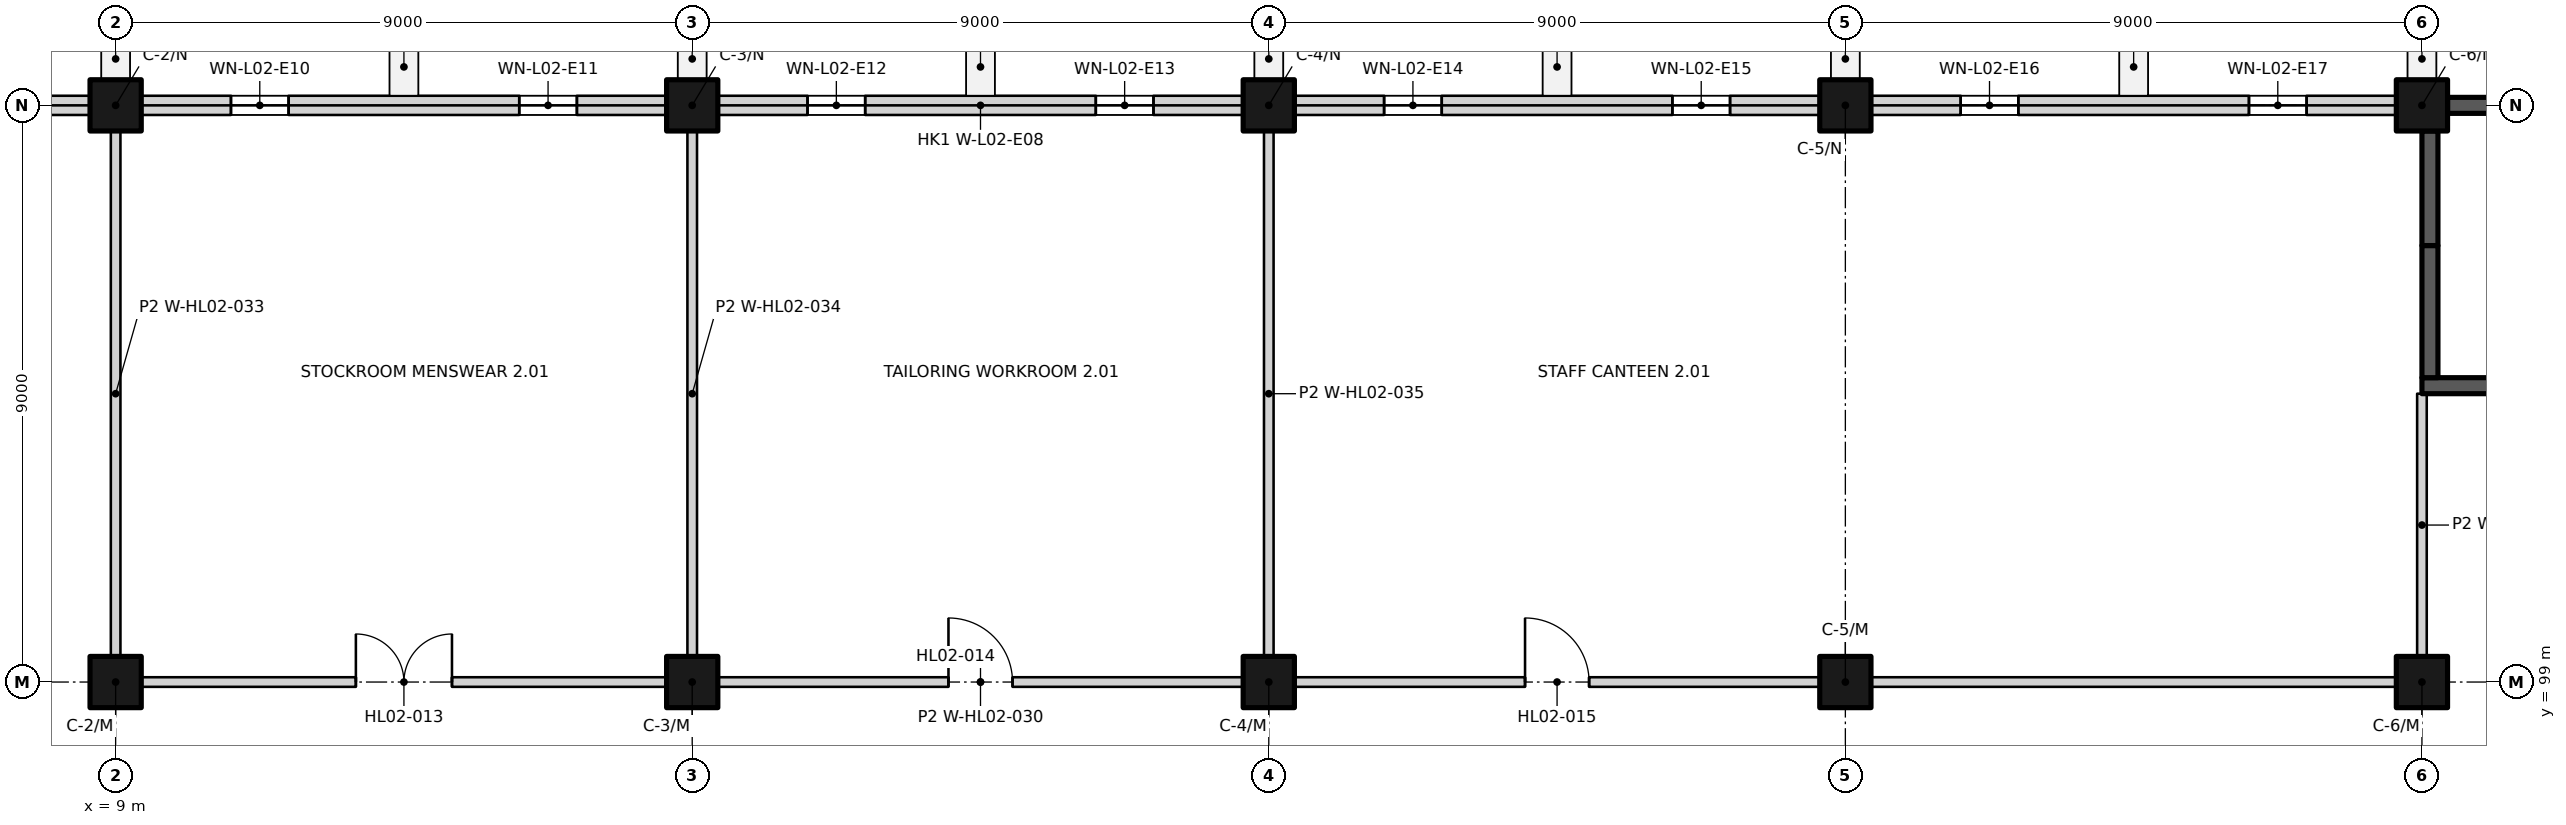
"""IFC4 building model, lengths in metres.
Left out: names, types, materials, properties, quantities, classifications, styles, units other than length and angle.
Written with IfcOpenShell. Run it as: python <this file> out.ifc"""

import sys

from ifc_helpers import new_model, si_unit, direction, frame, frame_2d, origin, origin_2d, place, context, subcontext, project, spatial, rectangle, extrude, element, fill, save


model = new_model("IFC4")
c1 = context("Model", 3, precision=1e-05, world=origin(), true_north=direction((0.0, 1.0)))
c2 = subcontext(c1, "Body", "Model", "MODEL_VIEW")
j1 = project(units=[si_unit("LENGTHUNIT", "METRE"), si_unit("PLANEANGLEUNIT", "RADIAN")], contexts=[c1])
p1 = place(None, origin())
s1 = spatial("IfcSite", under=j1, at=p1, CompositionType="ELEMENT")
p2 = place(p1, origin())
s2 = spatial("IfcBuilding", under=s1, at=p2, CompositionType="ELEMENT")
p3 = place(p2, frame((0.0, 0.0, 10.5)))
s3 = spatial("IfcBuildingStorey", under=s2, at=p3, CompositionType="ELEMENT", Elevation=10.5)
for number, where, z_axis, x_axis in (
    (1, (9.0, 99.0, 0.0), (0.0, 0.0, 1.0), (1.0, 0.0, 0.0)),
    (2, (18.0, 99.0, 0.0), (0.0, 0.0, 1.0), (1.0, 0.0, 0.0)),
    (3, (27.0, 99.0, 0.0), (0.0, 0.0, 1.0), (1.0, 0.0, 0.0)),
    (4, (36.0, 99.0, 0.0), (0.0, 0.0, 1.0), (1.0, 0.0, 0.0)),
    (5, (45.0, 99.0, 0.0), (0.0, 0.0, 1.0), (1.0, 0.0, 0.0)),
    (6, (9.0, 108.0, 0.0), (0.0, 0.0, 1.0), (1.0, 0.0, 0.0)),
    (7, (18.0, 108.0, 0.0), (0.0, 0.0, 1.0), (1.0, 0.0, 0.0)),
    (8, (27.0, 108.0, 0.0), (0.0, 0.0, 1.0), (1.0, 0.0, 0.0)),
    (9, (36.0, 108.0, 0.0), (0.0, 0.0, 1.0), (1.0, 0.0, 0.0)),
    (10, (45.0, 108.0, 0.0), (0.0, 0.0, 1.0), (1.0, 0.0, 0.0)),
):
    element("IfcColumn", number, at=place(p3, frame(where, z_axis=z_axis, x_axis=x_axis)), inside=s3, PredefinedType="COLUMN", context=c2, shape_type="SweptSolid", body=[
        extrude(rectangle(XDim=0.8, YDim=0.8, at=origin_2d()), origin(), (0.0, 0.0, 1.0), 4.5),
    ])
p4 = place(p3, frame((45.0, 103.625, 0.0), z_axis=(0.0, 0.0, 1.0), x_axis=(1.0, 0.0, 0.0)))
e11 = element("IfcWall", 11, at=p4, inside=s3, PredefinedType="SHEAR", context=c2, shape_type="SweptSolid", body=[
    extrude(rectangle(XDim=9.0, YDim=0.25, at=frame_2d((4.5, 0.0))), origin(), (0.0, 0.0, 1.0), 4.5),
])
p5 = place(p3, frame((45.4, 108.0, 0.0), z_axis=(0.0, 0.0, 1.0), x_axis=(1.0, 0.0, 0.0)))
e12 = element("IfcWall", 12, at=p5, inside=s3, PredefinedType="SHEAR", context=c2, shape_type="SweptSolid", body=[
    extrude(rectangle(XDim=8.2, YDim=0.25, at=frame_2d((4.1, 0.0))), origin(), (0.0, 0.0, 1.0), 4.5),
])
p6 = place(p3, frame((45.125, 103.75, 0.0), z_axis=(0.0, 0.0, 1.0), x_axis=(0.0, 1.0, 0.0)))
e13 = element("IfcWall", 13, at=p6, inside=s3, PredefinedType="SHEAR", context=c2, shape_type="SweptSolid", body=[
    extrude(rectangle(XDim=2.062, YDim=0.25, at=frame_2d((1.031, 0.0))), origin(), (0.0, 0.0, 1.0), 4.5),
])
p7 = place(p3, frame((45.125, 105.812, 0.0), z_axis=(0.0, 0.0, 1.0), x_axis=(0.0, 1.0, 0.0)))
e14 = element("IfcWall", 14, at=p7, inside=s3, PredefinedType="SHEAR", context=c2, shape_type="SweptSolid", body=[
    extrude(rectangle(XDim=1.788, YDim=0.25, at=frame_2d((0.894, 0.0))), origin(), (0.0, 0.0, 1.0), 4.5),
])
p8 = place(p3, frame((4.5, 108.0, 0.0), z_axis=(0.0, 0.0, 1.0), x_axis=(1.0, 0.0, 0.0)))
e15 = element("IfcWall", 15, at=p8, inside=s3, PredefinedType="SOLIDWALL", context=c2, shape_type="SweptSolid", body=[
    extrude(rectangle(XDim=4.1, YDim=0.3, at=frame_2d((2.05, 0.0))), origin(), (0.0, 0.0, 1.0), 3.7),
])
p9 = place(p8, frame((1.8, 0.0, 0.45)))
e16 = element("IfcOpeningElement", 16, at=p9, cuts=e15, PredefinedType="OPENING", context=c2, shape_type="SweptSolid", body=[
    extrude(rectangle(XDim=0.9, YDim=3.0, at=frame_2d((0.45, 1.5))), frame((0.0, 0.16, 0.0), z_axis=(0.0, -1.0, 0.0), x_axis=(1.0, 0.0, 0.0)), (0.0, 0.0, 1.0), 0.32),
])
p10 = place(p3, frame((9.4, 108.0, 0.0), z_axis=(0.0, 0.0, 1.0), x_axis=(1.0, 0.0, 0.0)))
e17 = element("IfcWall", 17, at=p10, inside=s3, PredefinedType="SOLIDWALL", context=c2, shape_type="SweptSolid", body=[
    extrude(rectangle(XDim=8.2, YDim=0.3, at=frame_2d((4.1, 0.0))), origin(), (0.0, 0.0, 1.0), 3.7),
])
p11 = place(p10, frame((1.4, 0.0, 0.45)))
e18 = element("IfcOpeningElement", 18, at=p11, cuts=e17, PredefinedType="OPENING", context=c2, shape_type="SweptSolid", body=[
    extrude(rectangle(XDim=0.9, YDim=3.0, at=frame_2d((0.45, 1.5))), frame((0.0, 0.16, 0.0), z_axis=(0.0, -1.0, 0.0), x_axis=(1.0, 0.0, 0.0)), (0.0, 0.0, 1.0), 0.32),
])
p12 = place(p10, frame((5.9, 0.0, 0.45)))
e19 = element("IfcOpeningElement", 19, at=p12, cuts=e17, PredefinedType="OPENING", context=c2, shape_type="SweptSolid", body=[
    extrude(rectangle(XDim=0.9, YDim=3.0, at=frame_2d((0.45, 1.5))), frame((0.0, 0.16, 0.0), z_axis=(0.0, -1.0, 0.0), x_axis=(1.0, 0.0, 0.0)), (0.0, 0.0, 1.0), 0.32),
])
p13 = place(p3, frame((18.4, 108.0, 0.0), z_axis=(0.0, 0.0, 1.0), x_axis=(1.0, 0.0, 0.0)))
e20 = element("IfcWall", 20, at=p13, inside=s3, PredefinedType="SOLIDWALL", context=c2, shape_type="SweptSolid", body=[
    extrude(rectangle(XDim=8.2, YDim=0.3, at=frame_2d((4.1, 0.0))), origin(), (0.0, 0.0, 1.0), 3.7),
])
p14 = place(p13, frame((1.4, 0.0, 0.45)))
e21 = element("IfcOpeningElement", 21, at=p14, cuts=e20, PredefinedType="OPENING", context=c2, shape_type="SweptSolid", body=[
    extrude(rectangle(XDim=0.9, YDim=3.0, at=frame_2d((0.45, 1.5))), frame((0.0, 0.16, 0.0), z_axis=(0.0, -1.0, 0.0), x_axis=(1.0, 0.0, 0.0)), (0.0, 0.0, 1.0), 0.32),
])
p15 = place(p13, frame((5.9, 0.0, 0.45)))
e22 = element("IfcOpeningElement", 22, at=p15, cuts=e20, PredefinedType="OPENING", context=c2, shape_type="SweptSolid", body=[
    extrude(rectangle(XDim=0.9, YDim=3.0, at=frame_2d((0.45, 1.5))), frame((0.0, 0.16, 0.0), z_axis=(0.0, -1.0, 0.0), x_axis=(1.0, 0.0, 0.0)), (0.0, 0.0, 1.0), 0.32),
])
p16 = place(p3, frame((27.4, 108.0, 0.0), z_axis=(0.0, 0.0, 1.0), x_axis=(1.0, 0.0, 0.0)))
e23 = element("IfcWall", 23, at=p16, inside=s3, PredefinedType="SOLIDWALL", context=c2, shape_type="SweptSolid", body=[
    extrude(rectangle(XDim=8.2, YDim=0.3, at=frame_2d((4.1, 0.0))), origin(), (0.0, 0.0, 1.0), 3.7),
])
p17 = place(p16, frame((1.4, 0.0, 0.45)))
e24 = element("IfcOpeningElement", 24, at=p17, cuts=e23, PredefinedType="OPENING", context=c2, shape_type="SweptSolid", body=[
    extrude(rectangle(XDim=0.9, YDim=3.0, at=frame_2d((0.45, 1.5))), frame((0.0, 0.16, 0.0), z_axis=(0.0, -1.0, 0.0), x_axis=(1.0, 0.0, 0.0)), (0.0, 0.0, 1.0), 0.32),
])
p18 = place(p16, frame((5.9, 0.0, 0.45)))
e25 = element("IfcOpeningElement", 25, at=p18, cuts=e23, PredefinedType="OPENING", context=c2, shape_type="SweptSolid", body=[
    extrude(rectangle(XDim=0.9, YDim=3.0, at=frame_2d((0.45, 1.5))), frame((0.0, 0.16, 0.0), z_axis=(0.0, -1.0, 0.0), x_axis=(1.0, 0.0, 0.0)), (0.0, 0.0, 1.0), 0.32),
])
p19 = place(p3, frame((36.4, 108.0, 0.0), z_axis=(0.0, 0.0, 1.0), x_axis=(1.0, 0.0, 0.0)))
e26 = element("IfcWall", 26, at=p19, inside=s3, PredefinedType="SOLIDWALL", context=c2, shape_type="SweptSolid", body=[
    extrude(rectangle(XDim=8.2, YDim=0.3, at=frame_2d((4.1, 0.0))), origin(), (0.0, 0.0, 1.0), 3.7),
])
p20 = place(p19, frame((1.4, 0.0, 0.45)))
e27 = element("IfcOpeningElement", 27, at=p20, cuts=e26, PredefinedType="OPENING", context=c2, shape_type="SweptSolid", body=[
    extrude(rectangle(XDim=0.9, YDim=3.0, at=frame_2d((0.45, 1.5))), frame((0.0, 0.16, 0.0), z_axis=(0.0, -1.0, 0.0), x_axis=(1.0, 0.0, 0.0)), (0.0, 0.0, 1.0), 0.32),
])
p21 = place(p19, frame((5.9, 0.0, 0.45)))
e28 = element("IfcOpeningElement", 28, at=p21, cuts=e26, PredefinedType="OPENING", context=c2, shape_type="SweptSolid", body=[
    extrude(rectangle(XDim=0.9, YDim=3.0, at=frame_2d((0.45, 1.5))), frame((0.0, 0.16, 0.0), z_axis=(0.0, -1.0, 0.0), x_axis=(1.0, 0.0, 0.0)), (0.0, 0.0, 1.0), 0.32),
])
p22 = place(p3, frame((9.4, 99.0, 0.0), z_axis=(0.0, 0.0, 1.0), x_axis=(1.0, 0.0, 0.0)))
e29 = element("IfcWall", 29, at=p22, inside=s3, PredefinedType="PARTITIONING", context=c2, shape_type="SweptSolid", body=[
    extrude(rectangle(XDim=8.2, YDim=0.15, at=frame_2d((4.1, 0.0))), origin(), (0.0, 0.0, 1.0), 4.2),
])
p23 = place(p22, frame((3.35, 0.0, 0.0)))
e30 = element("IfcOpeningElement", 30, at=p23, cuts=e29, PredefinedType="OPENING", context=c2, shape_type="SweptSolid", body=[
    extrude(rectangle(XDim=1.5, YDim=2.1, at=frame_2d((0.75, 1.05))), frame((0.0, 0.085, 0.0), z_axis=(0.0, -1.0, 0.0), x_axis=(1.0, 0.0, 0.0)), (0.0, 0.0, 1.0), 0.17),
])
p24 = place(p3, frame((18.4, 99.0, 0.0), z_axis=(0.0, 0.0, 1.0), x_axis=(1.0, 0.0, 0.0)))
e31 = element("IfcWall", 31, at=p24, inside=s3, PredefinedType="PARTITIONING", context=c2, shape_type="SweptSolid", body=[
    extrude(rectangle(XDim=8.2, YDim=0.15, at=frame_2d((4.1, 0.0))), origin(), (0.0, 0.0, 1.0), 4.2),
])
p25 = place(p24, frame((3.6, 0.0, 0.0)))
e32 = element("IfcOpeningElement", 32, at=p25, cuts=e31, PredefinedType="OPENING", context=c2, shape_type="SweptSolid", body=[
    extrude(rectangle(XDim=1.0, YDim=2.4, at=frame_2d((0.5, 1.2))), frame((0.0, 0.085, 0.0), z_axis=(0.0, -1.0, 0.0), x_axis=(1.0, 0.0, 0.0)), (0.0, 0.0, 1.0), 0.17),
])
p26 = place(p3, frame((27.4, 99.0, 0.0), z_axis=(0.0, 0.0, 1.0), x_axis=(1.0, 0.0, 0.0)))
e33 = element("IfcWall", 33, at=p26, inside=s3, PredefinedType="PARTITIONING", context=c2, shape_type="SweptSolid", body=[
    extrude(rectangle(XDim=8.2, YDim=0.15, at=frame_2d((4.1, 0.0))), origin(), (0.0, 0.0, 1.0), 4.2),
])
p27 = place(p26, frame((3.6, 0.0, 0.0)))
e34 = element("IfcOpeningElement", 34, at=p27, cuts=e33, PredefinedType="OPENING", context=c2, shape_type="SweptSolid", body=[
    extrude(rectangle(XDim=1.0, YDim=2.4, at=frame_2d((0.5, 1.2))), frame((0.0, 0.085, 0.0), z_axis=(0.0, -1.0, 0.0), x_axis=(1.0, 0.0, 0.0)), (0.0, 0.0, 1.0), 0.17),
])
for number, where, z_axis, x_axis in (
    (35, (36.4, 99.0, 0.0), (0.0, 0.0, 1.0), (1.0, 0.0, 0.0)),
    (36, (9.0, 99.4, 0.0), (0.0, 0.0, 1.0), (0.0, 1.0, 0.0)),
    (37, (18.0, 99.4, 0.0), (0.0, 0.0, 1.0), (0.0, 1.0, 0.0)),
    (38, (27.0, 99.4, 0.0), (0.0, 0.0, 1.0), (0.0, 1.0, 0.0)),
):
    element("IfcWall", number, at=place(p3, frame(where, z_axis=z_axis, x_axis=x_axis)), inside=s3, PredefinedType="PARTITIONING", context=c2, shape_type="SweptSolid", body=[
        extrude(rectangle(XDim=8.2, YDim=0.15, at=frame_2d((4.1, 0.0))), origin(), (0.0, 0.0, 1.0), 4.2),
    ])
p28 = place(p3, frame((45.0, 99.4, 0.0), z_axis=(0.0, 0.0, 1.0), x_axis=(0.0, 1.0, 0.0)))
e39 = element("IfcWall", 39, at=p28, inside=s3, PredefinedType="PARTITIONING", context=c2, shape_type="SweptSolid", body=[
    extrude(rectangle(XDim=4.1, YDim=0.15, at=frame_2d((2.05, 0.0))), origin(), (0.0, 0.0, 1.0), 4.2),
])
p29 = place(p11, origin())
e40 = element("IfcWindow", 40, at=p29, inside=s3, PartitioningType="SINGLE_PANEL", PredefinedType="WINDOW", context=c2, shape_type="SweptSolid", body=[
    extrude(rectangle(XDim=0.9, YDim=3.0, at=frame_2d((0.45, 1.5))), frame((0.0, -0.03, 0.0), z_axis=(0.0, -1.0, 0.0), x_axis=(1.0, 0.0, 0.0)), (0.0, 0.0, 1.0), 0.06),
])
fill(e18, e40)
p30 = place(p12, origin())
e41 = element("IfcWindow", 41, at=p30, inside=s3, PartitioningType="SINGLE_PANEL", PredefinedType="WINDOW", context=c2, shape_type="SweptSolid", body=[
    extrude(rectangle(XDim=0.9, YDim=3.0, at=frame_2d((0.45, 1.5))), frame((0.0, -0.03, 0.0), z_axis=(0.0, -1.0, 0.0), x_axis=(1.0, 0.0, 0.0)), (0.0, 0.0, 1.0), 0.06),
])
fill(e19, e41)
p31 = place(p14, origin())
e42 = element("IfcWindow", 42, at=p31, inside=s3, PartitioningType="SINGLE_PANEL", PredefinedType="WINDOW", context=c2, shape_type="SweptSolid", body=[
    extrude(rectangle(XDim=0.9, YDim=3.0, at=frame_2d((0.45, 1.5))), frame((0.0, -0.03, 0.0), z_axis=(0.0, -1.0, 0.0), x_axis=(1.0, 0.0, 0.0)), (0.0, 0.0, 1.0), 0.06),
])
fill(e21, e42)
p32 = place(p15, origin())
e43 = element("IfcWindow", 43, at=p32, inside=s3, PartitioningType="SINGLE_PANEL", PredefinedType="WINDOW", context=c2, shape_type="SweptSolid", body=[
    extrude(rectangle(XDim=0.9, YDim=3.0, at=frame_2d((0.45, 1.5))), frame((0.0, -0.03, 0.0), z_axis=(0.0, -1.0, 0.0), x_axis=(1.0, 0.0, 0.0)), (0.0, 0.0, 1.0), 0.06),
])
fill(e22, e43)
p33 = place(p17, origin())
e44 = element("IfcWindow", 44, at=p33, inside=s3, PartitioningType="SINGLE_PANEL", PredefinedType="WINDOW", context=c2, shape_type="SweptSolid", body=[
    extrude(rectangle(XDim=0.9, YDim=3.0, at=frame_2d((0.45, 1.5))), frame((0.0, -0.03, 0.0), z_axis=(0.0, -1.0, 0.0), x_axis=(1.0, 0.0, 0.0)), (0.0, 0.0, 1.0), 0.06),
])
fill(e24, e44)
p34 = place(p18, origin())
e45 = element("IfcWindow", 45, at=p34, inside=s3, PartitioningType="SINGLE_PANEL", PredefinedType="WINDOW", context=c2, shape_type="SweptSolid", body=[
    extrude(rectangle(XDim=0.9, YDim=3.0, at=frame_2d((0.45, 1.5))), frame((0.0, -0.03, 0.0), z_axis=(0.0, -1.0, 0.0), x_axis=(1.0, 0.0, 0.0)), (0.0, 0.0, 1.0), 0.06),
])
fill(e25, e45)
p35 = place(p20, origin())
e46 = element("IfcWindow", 46, at=p35, inside=s3, PartitioningType="SINGLE_PANEL", PredefinedType="WINDOW", context=c2, shape_type="SweptSolid", body=[
    extrude(rectangle(XDim=0.9, YDim=3.0, at=frame_2d((0.45, 1.5))), frame((0.0, -0.03, 0.0), z_axis=(0.0, -1.0, 0.0), x_axis=(1.0, 0.0, 0.0)), (0.0, 0.0, 1.0), 0.06),
])
fill(e27, e46)
p36 = place(p21, origin())
e47 = element("IfcWindow", 47, at=p36, inside=s3, PartitioningType="SINGLE_PANEL", PredefinedType="WINDOW", context=c2, shape_type="SweptSolid", body=[
    extrude(rectangle(XDim=0.9, YDim=3.0, at=frame_2d((0.45, 1.5))), frame((0.0, -0.03, 0.0), z_axis=(0.0, -1.0, 0.0), x_axis=(1.0, 0.0, 0.0)), (0.0, 0.0, 1.0), 0.06),
])
fill(e28, e47)
p37 = place(p23, origin())
e48 = element("IfcDoor", 48, at=p37, inside=s3, OperationType="DOUBLE_DOOR_SINGLE_SWING", PredefinedType="DOOR", context=c2, shape_type="SweptSolid", body=[
    extrude(rectangle(XDim=1.5, YDim=2.1, at=frame_2d((0.75, 1.05))), frame((0.0, 0.025, 0.0), z_axis=(0.0, -1.0, 0.0), x_axis=(1.0, 0.0, 0.0)), (0.0, 0.0, 1.0), 0.05),
])
fill(e30, e48)
p38 = place(p25, origin())
e49 = element("IfcDoor", 49, at=p38, inside=s3, OperationType="SINGLE_SWING_LEFT", PredefinedType="DOOR", context=c2, shape_type="SweptSolid", body=[
    extrude(rectangle(XDim=1.0, YDim=2.4, at=frame_2d((0.5, 1.2))), frame((0.0, 0.025, 0.0), z_axis=(0.0, -1.0, 0.0), x_axis=(1.0, 0.0, 0.0)), (0.0, 0.0, 1.0), 0.05),
])
fill(e32, e49)
p39 = place(p27, origin())
e50 = element("IfcDoor", 50, at=p39, inside=s3, OperationType="SINGLE_SWING_LEFT", PredefinedType="DOOR", context=c2, shape_type="SweptSolid", body=[
    extrude(rectangle(XDim=1.0, YDim=2.4, at=frame_2d((0.5, 1.2))), frame((0.0, 0.025, 0.0), z_axis=(0.0, -1.0, 0.0), x_axis=(1.0, 0.0, 0.0)), (0.0, 0.0, 1.0), 0.05),
])
fill(e34, e50)
save(model, sys.argv[1])
